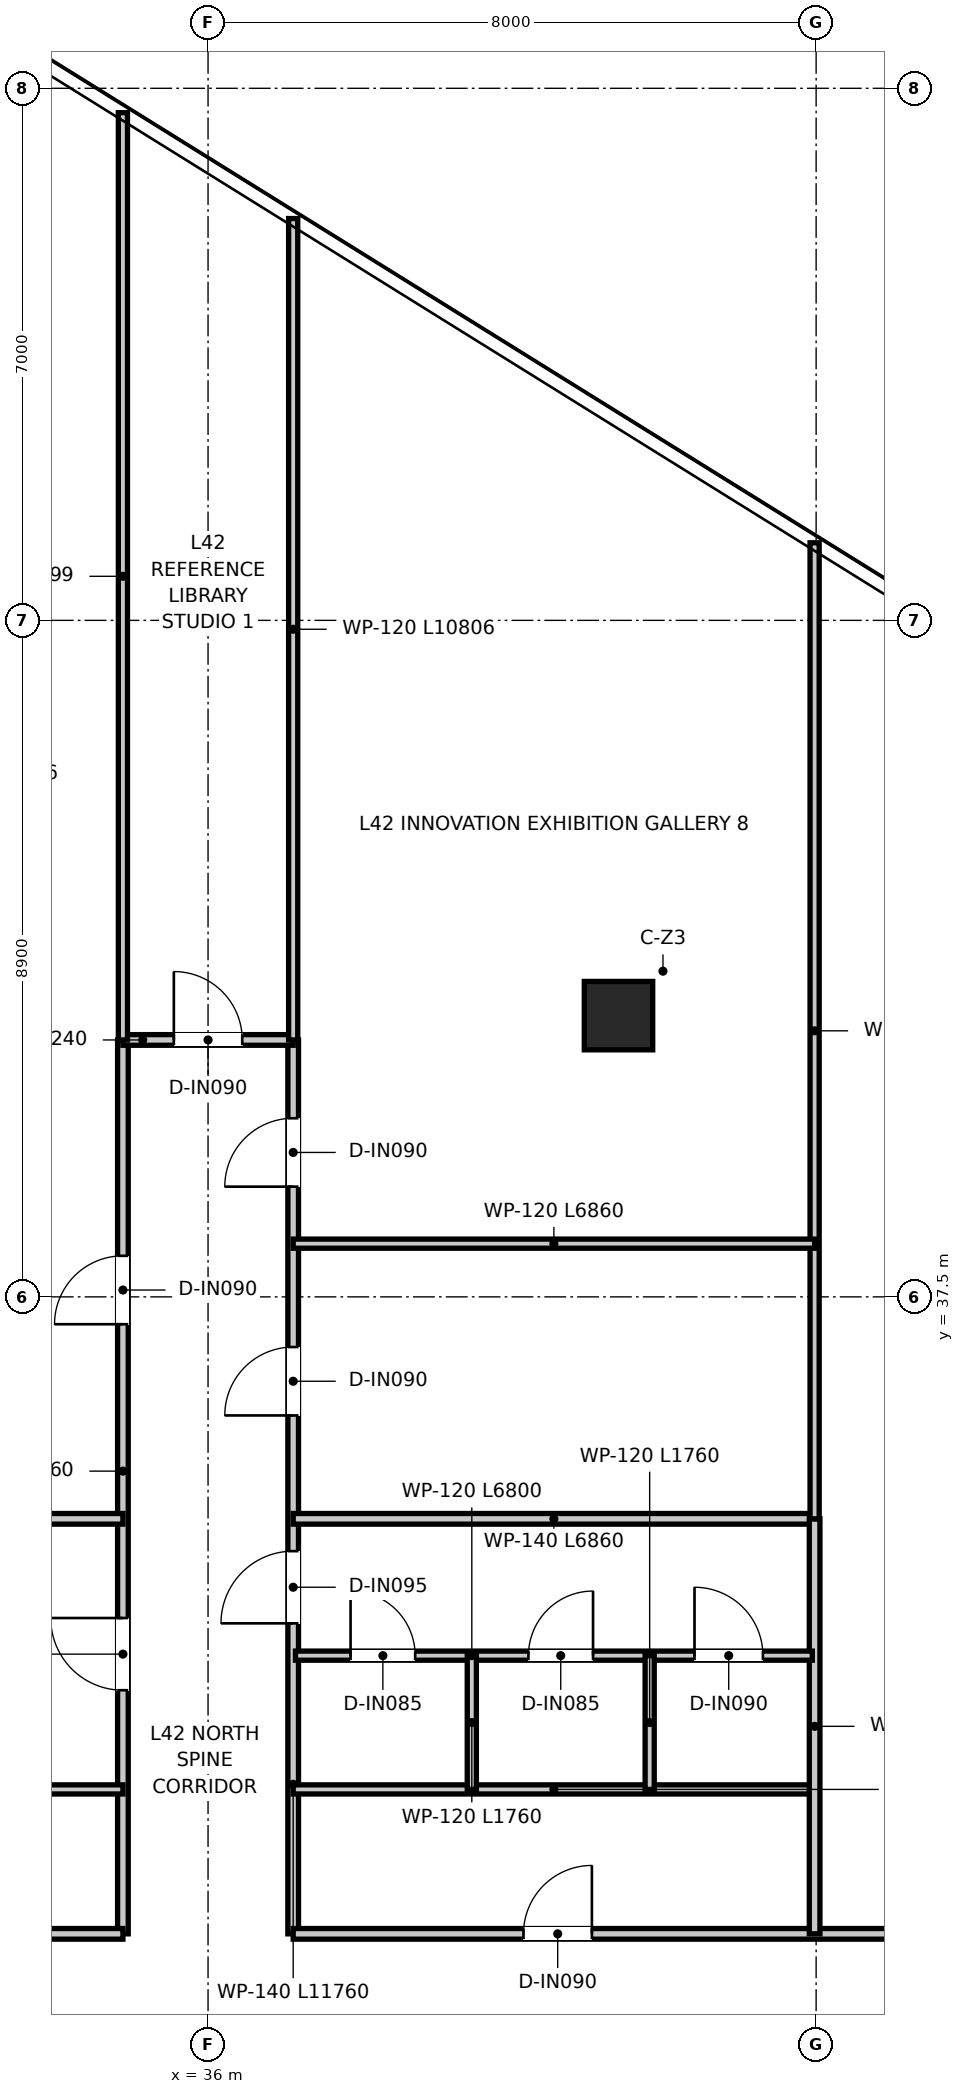
"""IFC4 building model, lengths in metres.
Left out: names, types, materials, properties, quantities, classifications, styles, units other than length and angle.
Written with IfcOpenShell. Run it as: python <this file> out.ifc"""

import sys

from ifc_helpers import new_model, si_unit, direction, frame, frame_2d, origin, origin_2d, place, context, subcontext, project, spatial, rectangle, extrude, source, transform, mapped, element, fill, save


model = new_model("IFC4")
c1 = context("Model", 3, precision=1e-05, world=origin(), true_north=direction((0.0, 1.0)))
c2 = subcontext(c1, "Body", "Model", "MODEL_VIEW")
j1 = project(units=[si_unit("LENGTHUNIT", "METRE"), si_unit("PLANEANGLEUNIT", "RADIAN")], contexts=[c1])
p1 = place(None, origin())
s1 = spatial("IfcSite", under=j1, at=p1, CompositionType="ELEMENT")
p2 = place(p1, origin())
s2 = spatial("IfcBuilding", under=s1, at=p2, CompositionType="ELEMENT")
p3 = place(p2, frame((0.0, 0.0, 173.85)))
s3 = spatial("IfcBuildingStorey", under=s2, at=p3, CompositionType="ELEMENT", Elevation=173.85)
m1 = source(origin(), c2, "Body", "SweptSolid", [
    extrude(rectangle(XDim=0.9, YDim=0.9, at=origin_2d()), origin(), (0.0, 0.0, 1.0), 3.95),
])
p4 = place(p3, frame((41.4, 41.2, 0.0), z_axis=(0.0, 0.0, 1.0), x_axis=(1.0, 0.0, 0.0)))
e1 = element("IfcColumn", 1, at=p4, inside=s3, PredefinedType="COLUMN", context=c2, shape_type="MappedRepresentation", body=[
    mapped(m1, transform((0.0, 0.0, 0.0), x_axis=(1.0, 0.0, 0.0), y_axis=(0.0, 1.0, 0.0), z_axis=(0.0, 0.0, 1.0), scale=1.0)),
])
p5 = place(p3, frame((34.88, 29.12, 0.0), z_axis=(0.0, 0.0, 1.0), x_axis=(0.0, 1.0, 0.0)))
e2 = element("IfcWall", 2, at=p5, inside=s3, PredefinedType="PARTITIONING", context=c2, shape_type="SweptSolid", body=[
    extrude(rectangle(XDim=11.76, YDim=0.14, at=frame_2d((5.88, 0.0))), origin(), (0.0, 0.0, 1.0), 3.03),
])
p6 = place(p5, frame((3.205, 0.0, 0.0)))
e3 = element("IfcOpeningElement", 3, at=p6, cuts=e2, PredefinedType="OPENING", context=c2, shape_type="SweptSolid", body=[
    extrude(rectangle(XDim=0.95, YDim=2.1, at=frame_2d((0.475, 1.05))), frame((0.0, 0.08, 0.0), z_axis=(0.0, -1.0, 0.0), x_axis=(1.0, 0.0, 0.0)), (0.0, 0.0, 1.0), 0.16),
])
p7 = place(p5, frame((8.02, 0.0, 0.0)))
e4 = element("IfcOpeningElement", 4, at=p7, cuts=e2, PredefinedType="OPENING", context=c2, shape_type="SweptSolid", body=[
    extrude(rectangle(XDim=0.9, YDim=2.1, at=frame_2d((0.45, 1.05))), frame((0.0, 0.08, 0.0), z_axis=(0.0, -1.0, 0.0), x_axis=(1.0, 0.0, 0.0)), (0.0, 0.0, 1.0), 0.16),
])
p8 = place(p3, frame((37.12, 29.12, 0.0), z_axis=(0.0, 0.0, 1.0), x_axis=(0.0, 1.0, 0.0)))
e5 = element("IfcWall", 5, at=p8, inside=s3, PredefinedType="PARTITIONING", context=c2, shape_type="SweptSolid", body=[
    extrude(rectangle(XDim=11.76, YDim=0.14, at=frame_2d((5.88, 0.0))), origin(), (0.0, 0.0, 1.0), 3.03),
])
p9 = place(p8, frame((4.085, 0.0, 0.0)))
e6 = element("IfcOpeningElement", 6, at=p9, cuts=e5, PredefinedType="OPENING", context=c2, shape_type="SweptSolid", body=[
    extrude(rectangle(XDim=0.95, YDim=2.1, at=frame_2d((0.475, 1.05))), frame((0.0, 0.08, 0.0), z_axis=(0.0, -1.0, 0.0), x_axis=(1.0, 0.0, 0.0)), (0.0, 0.0, 1.0), 0.16),
])
p10 = place(p8, frame((6.82, 0.0, 0.0)))
e7 = element("IfcOpeningElement", 7, at=p10, cuts=e5, PredefinedType="OPENING", context=c2, shape_type="SweptSolid", body=[
    extrude(rectangle(XDim=0.9, YDim=2.1, at=frame_2d((0.45, 1.05))), frame((0.0, 0.08, 0.0), z_axis=(0.0, -1.0, 0.0), x_axis=(1.0, 0.0, 0.0)), (0.0, 0.0, 1.0), 0.16),
])
p11 = place(p8, frame((9.83, 0.0, 0.0)))
e8 = element("IfcOpeningElement", 8, at=p11, cuts=e5, PredefinedType="OPENING", context=c2, shape_type="SweptSolid", body=[
    extrude(rectangle(XDim=0.9, YDim=2.1, at=frame_2d((0.45, 1.05))), frame((0.0, 0.08, 0.0), z_axis=(0.0, -1.0, 0.0), x_axis=(1.0, 0.0, 0.0)), (0.0, 0.0, 1.0), 0.16),
])
p12 = place(p3, frame((34.88, 40.88, 0.0), z_axis=(0.0, 0.0, 1.0), x_axis=(1.0, 0.0, 0.0)))
e9 = element("IfcWall", 9, at=p12, inside=s3, PredefinedType="PARTITIONING", context=c2, shape_type="SweptSolid", body=[
    extrude(rectangle(XDim=2.24, YDim=0.14, at=frame_2d((1.12, 0.0))), origin(), (0.0, 0.0, 1.0), 3.67),
])
p13 = place(p12, frame((0.67, 0.0, 0.0)))
e10 = element("IfcOpeningElement", 10, at=p13, cuts=e9, PredefinedType="OPENING", context=c2, shape_type="SweptSolid", body=[
    extrude(rectangle(XDim=0.9, YDim=2.1, at=frame_2d((0.45, 1.05))), frame((0.0, 0.08, 0.0), z_axis=(0.0, -1.0, 0.0), x_axis=(1.0, 0.0, 0.0)), (0.0, 0.0, 1.0), 0.16),
])
p14 = place(p3, frame((11.822, 29.12, 0.0), z_axis=(0.0, 0.0, 1.0), x_axis=(1.0, 0.0, 0.0)))
e11 = element("IfcWall", 11, at=p14, inside=s3, PredefinedType="PARTITIONING", context=c2, shape_type="SweptSolid", body=[
    extrude(rectangle(XDim=23.058, YDim=0.14, at=frame_2d((11.529, 0.0))), origin(), (0.0, 0.0, 1.0), 3.03),
])
p15 = place(p14, frame((19.128, 0.0, 0.0)))
e12 = element("IfcOpeningElement", 12, at=p15, cuts=e11, PredefinedType="OPENING", context=c2, shape_type="SweptSolid", body=[
    extrude(rectangle(XDim=0.9, YDim=2.1, at=frame_2d((0.45, 1.05))), frame((0.0, 0.08, 0.0), z_axis=(0.0, -1.0, 0.0), x_axis=(1.0, 0.0, 0.0)), (0.0, 0.0, 1.0), 0.16),
])
p16 = place(p14, frame((2.137, 0.0, 0.0)))
e13 = element("IfcOpeningElement", 13, at=p16, cuts=e11, PredefinedType="OPENING", context=c2, shape_type="SweptSolid", body=[
    extrude(rectangle(XDim=0.9, YDim=2.1, at=frame_2d((0.45, 1.05))), frame((0.0, 0.08, 0.0), z_axis=(0.0, -1.0, 0.0), x_axis=(1.0, 0.0, 0.0)), (0.0, 0.0, 1.0), 0.16),
])
p17 = place(p14, frame((8.728, 0.0, 0.0)))
e14 = element("IfcOpeningElement", 14, at=p17, cuts=e11, PredefinedType="OPENING", context=c2, shape_type="SweptSolid", body=[
    extrude(rectangle(XDim=0.9, YDim=2.1, at=frame_2d((0.45, 1.05))), frame((0.0, 0.08, 0.0), z_axis=(0.0, -1.0, 0.0), x_axis=(1.0, 0.0, 0.0)), (0.0, 0.0, 1.0), 0.16),
])
p18 = place(p14, frame((11.578, 0.0, 0.0)))
e15 = element("IfcOpeningElement", 15, at=p18, cuts=e11, PredefinedType="OPENING", context=c2, shape_type="SweptSolid", body=[
    extrude(rectangle(XDim=0.9, YDim=2.1, at=frame_2d((0.45, 1.05))), frame((0.0, 0.08, 0.0), z_axis=(0.0, -1.0, 0.0), x_axis=(1.0, 0.0, 0.0)), (0.0, 0.0, 1.0), 0.16),
])
p19 = place(p14, frame((14.128, 0.0, 0.0)))
e16 = element("IfcOpeningElement", 16, at=p19, cuts=e11, PredefinedType="OPENING", context=c2, shape_type="SweptSolid", body=[
    extrude(rectangle(XDim=0.9, YDim=2.1, at=frame_2d((0.45, 1.05))), frame((0.0, 0.08, 0.0), z_axis=(0.0, -1.0, 0.0), x_axis=(1.0, 0.0, 0.0)), (0.0, 0.0, 1.0), 0.16),
])
p20 = place(p3, frame((37.12, 29.12, 0.0), z_axis=(0.0, 0.0, 1.0), x_axis=(1.0, 0.0, 0.0)))
e17 = element("IfcWall", 17, at=p20, inside=s3, PredefinedType="PARTITIONING", context=c2, shape_type="SweptSolid", body=[
    extrude(rectangle(XDim=26.068, YDim=0.14, at=frame_2d((13.034, 0.0))), origin(), (0.0, 0.0, 1.0), 3.03),
])
p21 = place(p20, frame((3.03, 0.0, 0.0)))
e18 = element("IfcOpeningElement", 18, at=p21, cuts=e17, PredefinedType="OPENING", context=c2, shape_type="SweptSolid", body=[
    extrude(rectangle(XDim=0.9, YDim=2.1, at=frame_2d((0.45, 1.05))), frame((0.0, 0.08, 0.0), z_axis=(0.0, -1.0, 0.0), x_axis=(1.0, 0.0, 0.0)), (0.0, 0.0, 1.0), 0.16),
])
p22 = place(p20, frame((15.761, 0.0, 0.0)))
e19 = element("IfcOpeningElement", 19, at=p22, cuts=e17, PredefinedType="OPENING", context=c2, shape_type="SweptSolid", body=[
    extrude(rectangle(XDim=0.9, YDim=2.1, at=frame_2d((0.45, 1.05))), frame((0.0, 0.08, 0.0), z_axis=(0.0, -1.0, 0.0), x_axis=(1.0, 0.0, 0.0)), (0.0, 0.0, 1.0), 0.16),
])
for number, where, z_axis, x_axis in (
    (20, (28.02, 31.02, 0.0), (0.0, 0.0, 1.0), (1.0, 0.0, 0.0)),
    (21, (37.12, 31.02, 0.0), (0.0, 0.0, 1.0), (1.0, 0.0, 0.0)),
):
    element("IfcWall", number, at=place(p3, frame(where, z_axis=z_axis, x_axis=x_axis)), inside=s3, PredefinedType="PARTITIONING", context=c2, shape_type="SweptSolid", body=[
        extrude(rectangle(XDim=6.86, YDim=0.12, at=frame_2d((3.43, 0.0))), origin(), (0.0, 0.0, 1.0), 3.08),
    ])
for number, where, z_axis, x_axis in (
    (22, (28.02, 34.58, 0.0), (0.0, 0.0, 1.0), (1.0, 0.0, 0.0)),
    (23, (37.12, 34.58, 0.0), (0.0, 0.0, 1.0), (1.0, 0.0, 0.0)),
):
    element("IfcWall", number, at=place(p3, frame(where, z_axis=z_axis, x_axis=x_axis)), inside=s3, PredefinedType="PARTITIONING", context=c2, shape_type="SweptSolid", body=[
        extrude(rectangle(XDim=6.86, YDim=0.14, at=frame_2d((3.43, 0.0))), origin(), (0.0, 0.0, 1.0), 3.08),
    ])
p23 = place(p3, frame((43.98, 29.12, 0.0), z_axis=(0.0, 0.0, 1.0), x_axis=(0.0, 1.0, 0.0)))
e24 = element("IfcWall", 24, at=p23, inside=s3, PredefinedType="PARTITIONING", context=c2, shape_type="SweptSolid", body=[
    extrude(rectangle(XDim=5.46, YDim=0.14, at=frame_2d((2.73, 0.0))), origin(), (0.0, 0.0, 1.0), 3.31),
])
p24 = place(p3, frame((37.15, 32.78, 0.0), z_axis=(0.0, 0.0, 1.0), x_axis=(1.0, 0.0, 0.0)))
e25 = element("IfcWall", 25, at=p24, inside=s3, PredefinedType="PARTITIONING", context=c2, shape_type="SweptSolid", body=[
    extrude(rectangle(XDim=6.8, YDim=0.12, at=frame_2d((3.4, 0.0))), origin(), (0.0, 0.0, 1.0), 3.08),
])
p25 = place(p24, frame((0.725, 0.0, 0.0)))
e26 = element("IfcOpeningElement", 26, at=p25, cuts=e25, PredefinedType="OPENING", context=c2, shape_type="SweptSolid", body=[
    extrude(rectangle(XDim=0.85, YDim=2.1, at=frame_2d((0.425, 1.05))), frame((0.0, 0.07, 0.0), z_axis=(0.0, -1.0, 0.0), x_axis=(1.0, 0.0, 0.0)), (0.0, 0.0, 1.0), 0.14),
])
p26 = place(p24, frame((3.065, 0.0, 0.0)))
e27 = element("IfcOpeningElement", 27, at=p26, cuts=e25, PredefinedType="OPENING", context=c2, shape_type="SweptSolid", body=[
    extrude(rectangle(XDim=0.85, YDim=2.1, at=frame_2d((0.425, 1.05))), frame((0.0, 0.07, 0.0), z_axis=(0.0, -1.0, 0.0), x_axis=(1.0, 0.0, 0.0)), (0.0, 0.0, 1.0), 0.14),
])
p27 = place(p24, frame((5.25, 0.0, 0.0)))
e28 = element("IfcOpeningElement", 28, at=p27, cuts=e25, PredefinedType="OPENING", context=c2, shape_type="SweptSolid", body=[
    extrude(rectangle(XDim=0.9, YDim=2.1, at=frame_2d((0.45, 1.05))), frame((0.0, 0.07, 0.0), z_axis=(0.0, -1.0, 0.0), x_axis=(1.0, 0.0, 0.0)), (0.0, 0.0, 1.0), 0.14),
])
for number, where, z_axis, x_axis in (
    (29, (39.47, 31.02, 0.0), (0.0, 0.0, 1.0), (0.0, 1.0, 0.0)),
    (30, (41.81, 31.02, 0.0), (0.0, 0.0, 1.0), (0.0, 1.0, 0.0)),
):
    element("IfcWall", number, at=place(p3, frame(where, z_axis=z_axis, x_axis=x_axis)), inside=s3, PredefinedType="PARTITIONING", context=c2, shape_type="SweptSolid", body=[
        extrude(rectangle(XDim=1.76, YDim=0.12, at=frame_2d((0.88, 0.0))), origin(), (0.0, 0.0, 1.0), 3.67),
    ])
p28 = place(p3, frame((34.88, 40.88, 0.0), z_axis=(0.0, 0.0, 1.0), x_axis=(0.0, 1.0, 0.0)))
e31 = element("IfcWall", 31, at=p28, inside=s3, PredefinedType="PARTITIONING", context=c2, shape_type="SweptSolid", body=[
    extrude(rectangle(XDim=12.199, YDim=0.12, at=frame_2d((6.1, 0.0))), origin(), (0.0, 0.0, 1.0), 3.28),
])
p29 = place(p3, frame((37.12, 40.88, 0.0), z_axis=(0.0, 0.0, 1.0), x_axis=(0.0, 1.0, 0.0)))
e32 = element("IfcWall", 32, at=p29, inside=s3, PredefinedType="PARTITIONING", context=c2, shape_type="SweptSolid", body=[
    extrude(rectangle(XDim=10.807, YDim=0.12, at=frame_2d((5.403, 0.0))), origin(), (0.0, 0.0, 1.0), 3.28),
])
p30 = place(p3, frame((43.98, 34.58, 0.0), z_axis=(0.0, 0.0, 1.0), x_axis=(0.0, 1.0, 0.0)))
e33 = element("IfcWall", 33, at=p30, inside=s3, PredefinedType="PARTITIONING", context=c2, shape_type="SweptSolid", body=[
    extrude(rectangle(XDim=12.841, YDim=0.12, at=frame_2d((6.42, 0.0))), origin(), (0.0, 0.0, 1.0), 3.03),
])
p31 = place(p3, frame((37.12, 38.2, 0.0), z_axis=(0.0, 0.0, 1.0), x_axis=(1.0, 0.0, 0.0)))
e34 = element("IfcWall", 34, at=p31, inside=s3, PredefinedType="PARTITIONING", context=c2, shape_type="SweptSolid", body=[
    extrude(rectangle(XDim=6.86, YDim=0.12, at=frame_2d((3.43, 0.0))), origin(), (0.0, 0.0, 1.0), 3.08),
])
p32 = place(p21, origin())
e35 = element("IfcDoor", 35, at=p32, inside=s3, OperationType="SINGLE_SWING_RIGHT", PredefinedType="DOOR", context=c2, shape_type="SweptSolid", body=[
    extrude(rectangle(XDim=0.9, YDim=2.1, at=frame_2d((0.45, 1.05))), frame((0.0, 0.025, 0.0), z_axis=(0.0, -1.0, 0.0), x_axis=(1.0, 0.0, 0.0)), (0.0, 0.0, 1.0), 0.05),
])
fill(e18, e35)
p33 = place(p9, origin())
e36 = element("IfcDoor", 36, at=p33, inside=s3, OperationType="SINGLE_SWING_LEFT", PredefinedType="DOOR", context=c2, shape_type="SweptSolid", body=[
    extrude(rectangle(XDim=0.95, YDim=2.1, at=frame_2d((0.475, 1.05))), frame((0.0, 0.025, 0.0), z_axis=(0.0, -1.0, 0.0), x_axis=(1.0, 0.0, 0.0)), (0.0, 0.0, 1.0), 0.05),
])
fill(e6, e36)
p34 = place(p6, origin())
e37 = element("IfcDoor", 37, at=p34, inside=s3, OperationType="SINGLE_SWING_RIGHT", PredefinedType="DOOR", context=c2, shape_type="SweptSolid", body=[
    extrude(rectangle(XDim=0.95, YDim=2.1, at=frame_2d((0.475, 1.05))), frame((0.0, 0.025, 0.0), z_axis=(0.0, -1.0, 0.0), x_axis=(1.0, 0.0, 0.0)), (0.0, 0.0, 1.0), 0.05),
])
fill(e3, e37)
p35 = place(p25, origin())
e38 = element("IfcDoor", 38, at=p35, inside=s3, OperationType="SINGLE_SWING_LEFT", PredefinedType="DOOR", context=c2, shape_type="SweptSolid", body=[
    extrude(rectangle(XDim=0.85, YDim=2.1, at=frame_2d((0.425, 1.05))), frame((0.0, 0.025, 0.0), z_axis=(0.0, -1.0, 0.0), x_axis=(1.0, 0.0, 0.0)), (0.0, 0.0, 1.0), 0.05),
])
fill(e26, e38)
p36 = place(p26, origin())
e39 = element("IfcDoor", 39, at=p36, inside=s3, OperationType="SINGLE_SWING_RIGHT", PredefinedType="DOOR", context=c2, shape_type="SweptSolid", body=[
    extrude(rectangle(XDim=0.85, YDim=2.1, at=frame_2d((0.425, 1.05))), frame((0.0, 0.025, 0.0), z_axis=(0.0, -1.0, 0.0), x_axis=(1.0, 0.0, 0.0)), (0.0, 0.0, 1.0), 0.05),
])
fill(e27, e39)
p37 = place(p27, origin())
e40 = element("IfcDoor", 40, at=p37, inside=s3, OperationType="SINGLE_SWING_LEFT", PredefinedType="DOOR", context=c2, shape_type="SweptSolid", body=[
    extrude(rectangle(XDim=0.9, YDim=2.1, at=frame_2d((0.45, 1.05))), frame((0.0, 0.025, 0.0), z_axis=(0.0, -1.0, 0.0), x_axis=(1.0, 0.0, 0.0)), (0.0, 0.0, 1.0), 0.05),
])
fill(e28, e40)
p38 = place(p13, origin())
e41 = element("IfcDoor", 41, at=p38, inside=s3, OperationType="SINGLE_SWING_LEFT", PredefinedType="DOOR", context=c2, shape_type="SweptSolid", body=[
    extrude(rectangle(XDim=0.9, YDim=2.1, at=frame_2d((0.45, 1.05))), frame((0.0, 0.025, 0.0), z_axis=(0.0, -1.0, 0.0), x_axis=(1.0, 0.0, 0.0)), (0.0, 0.0, 1.0), 0.05),
])
fill(e10, e41)
p39 = place(p7, origin())
e42 = element("IfcDoor", 42, at=p39, inside=s3, OperationType="SINGLE_SWING_LEFT", PredefinedType="DOOR", context=c2, shape_type="SweptSolid", body=[
    extrude(rectangle(XDim=0.9, YDim=2.1, at=frame_2d((0.45, 1.05))), frame((0.0, 0.025, 0.0), z_axis=(0.0, -1.0, 0.0), x_axis=(1.0, 0.0, 0.0)), (0.0, 0.0, 1.0), 0.05),
])
fill(e4, e42)
p40 = place(p10, origin())
e43 = element("IfcDoor", 43, at=p40, inside=s3, OperationType="SINGLE_SWING_LEFT", PredefinedType="DOOR", context=c2, shape_type="SweptSolid", body=[
    extrude(rectangle(XDim=0.9, YDim=2.1, at=frame_2d((0.45, 1.05))), frame((0.0, 0.025, 0.0), z_axis=(0.0, -1.0, 0.0), x_axis=(1.0, 0.0, 0.0)), (0.0, 0.0, 1.0), 0.05),
])
fill(e7, e43)
p41 = place(p11, origin())
e44 = element("IfcDoor", 44, at=p41, inside=s3, OperationType="SINGLE_SWING_LEFT", PredefinedType="DOOR", context=c2, shape_type="SweptSolid", body=[
    extrude(rectangle(XDim=0.9, YDim=2.1, at=frame_2d((0.45, 1.05))), frame((0.0, 0.025, 0.0), z_axis=(0.0, -1.0, 0.0), x_axis=(1.0, 0.0, 0.0)), (0.0, 0.0, 1.0), 0.05),
])
fill(e8, e44)
save(model, sys.argv[1])
